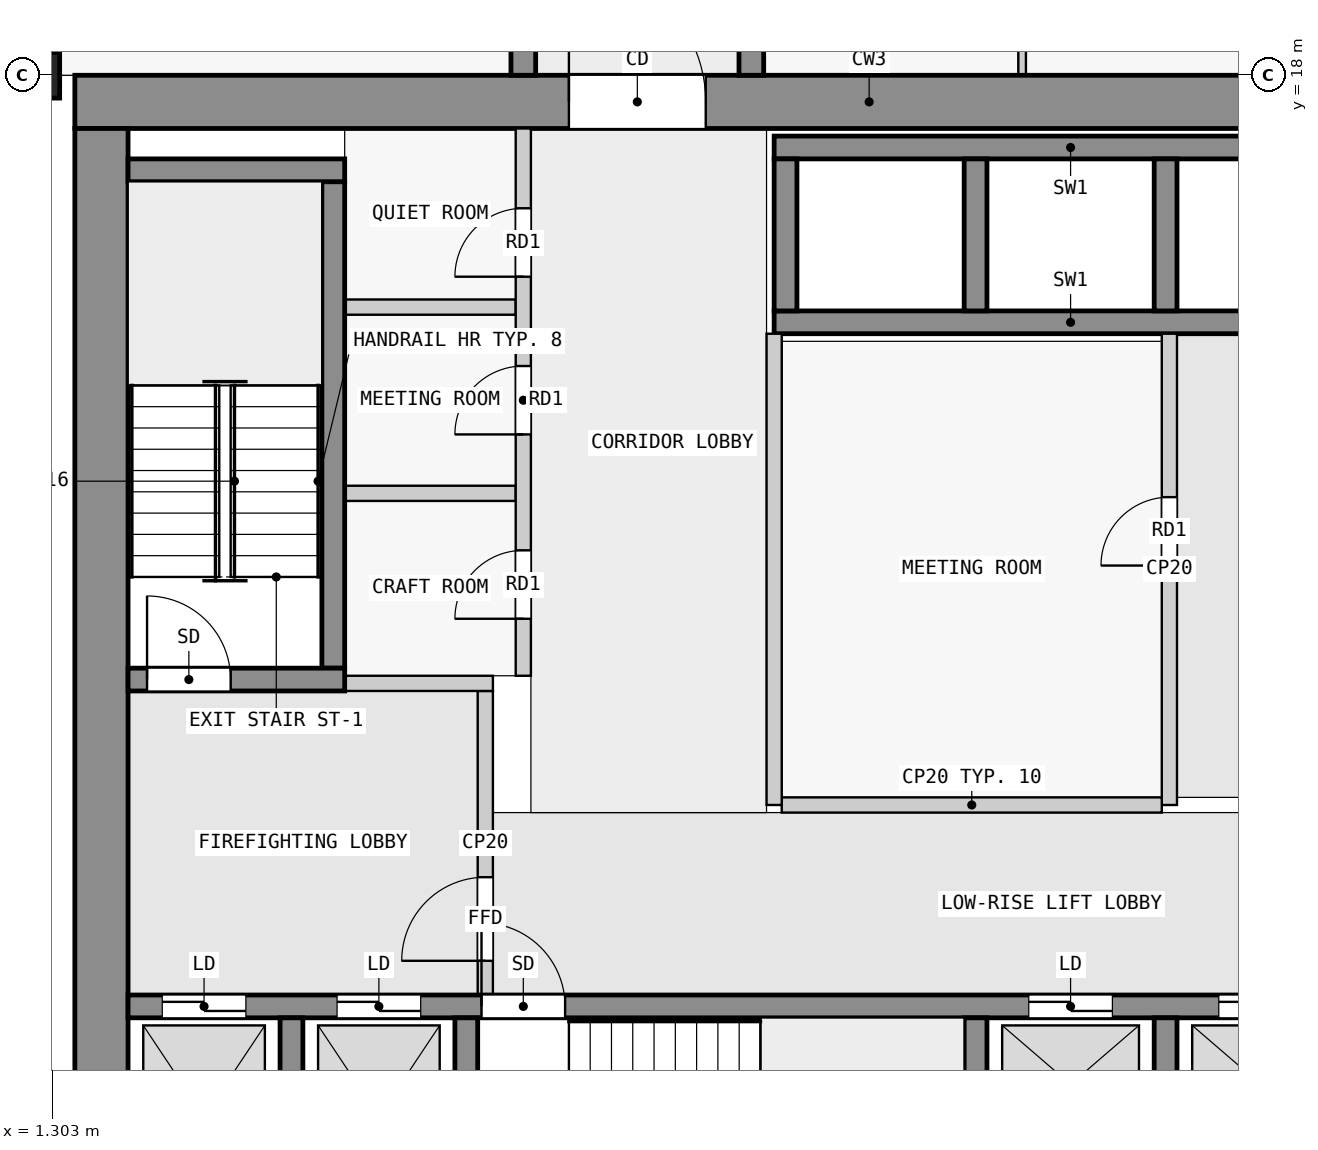
"""IFC4 building model, lengths in metres.
Left out: names, types, materials, properties, quantities, classifications, styles, units other than length and angle.
Written with IfcOpenShell. Run it as: python <this file> out.ifc"""

import sys

from ifc_helpers import new_model, si_unit, direction, frame, frame_2d, origin, origin_2d, place, context, subcontext, project, spatial, rectangle, extrude, element, fill, save


model = new_model("IFC4")
c1 = context("Model", 3, precision=1e-05, world=origin(), true_north=direction((0.0, 1.0)))
c2 = subcontext(c1, "Body", "Model", "MODEL_VIEW")
j1 = project(units=[si_unit("LENGTHUNIT", "METRE"), si_unit("PLANEANGLEUNIT", "RADIAN")], contexts=[c1])
p1 = place(None, origin())
s1 = spatial("IfcSite", under=j1, at=p1, CompositionType="ELEMENT")
p2 = place(p1, origin())
s2 = spatial("IfcBuilding", under=s1, at=p2, CompositionType="ELEMENT")
p3 = place(p2, frame((0.0, 0.0, 81.8)))
s3 = spatial("IfcBuildingStorey", under=s2, at=p3, CompositionType="ELEMENT", Elevation=81.8)
p4 = place(p3, frame((0.7, 18.0, 0.0), z_axis=(0.0, 0.0, 1.0), x_axis=(0.0, 1.0, 0.0)))
e1 = element("IfcColumn", 1, at=p4, inside=s3, PredefinedType="COLUMN", context=c2, shape_type="SweptSolid", body=[
    extrude(rectangle(XDim=0.6, YDim=1.4, at=origin_2d()), origin(), (0.0, 0.0, 1.0), 3.5),
])
p5 = place(p3, frame((1.6, 17.65, 0.0), z_axis=(0.0, 0.0, 1.0), x_axis=(1.0, 0.0, 0.0)))
e2 = element("IfcWall", 2, at=p5, inside=s3, PredefinedType="SHEAR", context=c2, shape_type="SweptSolid", body=[
    extrude(rectangle(XDim=20.9, YDim=0.7, at=frame_2d((10.45, 0.0))), origin(), (0.0, 0.0, 1.0), 3.25),
])
p6 = place(p5, frame((6.5, 0.0, 0.0)))
e3 = element("IfcOpeningElement", 3, at=p6, cuts=e2, PredefinedType="OPENING", context=c2, shape_type="SweptSolid", body=[
    extrude(rectangle(XDim=1.8, YDim=2.1, at=frame_2d((0.9, 1.05))), frame((0.0, 0.36, 0.0), z_axis=(0.0, -1.0, 0.0), x_axis=(1.0, 0.0, 0.0)), (0.0, 0.0, 1.0), 0.72),
])
p7 = place(p3, frame((1.95, 2.5, 0.0), z_axis=(0.0, 0.0, 1.0), x_axis=(0.0, 1.0, 0.0)))
e4 = element("IfcWall", 4, at=p7, inside=s3, PredefinedType="SHEAR", context=c2, shape_type="SweptSolid", body=[
    extrude(rectangle(XDim=14.8, YDim=0.7, at=frame_2d((7.4, 0.0))), origin(), (0.0, 0.0, 1.0), 3.25),
])
for number, where, z_axis, x_axis in (
    (5, (4.45, 2.8, 0.0), (0.0, 0.0, 1.0), (0.0, 1.0, 0.0)),
    (6, (6.75, 2.8, 0.0), (0.0, 0.0, 1.0), (0.0, 1.0, 0.0)),
    (7, (13.45, 2.8, 0.0), (0.0, 0.0, 1.0), (0.0, 1.0, 0.0)),
    (8, (15.95, 2.8, 0.0), (0.0, 0.0, 1.0), (0.0, 1.0, 0.0)),
):
    element("IfcWall", number, at=place(p3, frame(where, z_axis=z_axis, x_axis=x_axis)), inside=s3, PredefinedType="SHEAR", context=c2, shape_type="SweptSolid", body=[
        extrude(rectangle(XDim=2.8, YDim=0.3, at=frame_2d((1.4, 0.0))), origin(), (0.0, 0.0, 1.0), 3.25),
    ])
p8 = place(p3, frame((2.3, 5.75, 0.0), z_axis=(0.0, 0.0, 1.0), x_axis=(1.0, 0.0, 0.0)))
e9 = element("IfcWall", 9, at=p8, inside=s3, PredefinedType="SHEAR", context=c2, shape_type="SweptSolid", body=[
    extrude(rectangle(XDim=18.8, YDim=0.3, at=frame_2d((9.4, 0.0))), origin(), (0.0, 0.0, 1.0), 3.25),
])
p9 = place(p8, frame((4.65, 0.0, 0.0)))
e10 = element("IfcOpeningElement", 10, at=p9, cuts=e9, PredefinedType="OPENING", context=c2, shape_type="SweptSolid", body=[
    extrude(rectangle(XDim=1.1, YDim=2.1, at=frame_2d((0.55, 1.05))), frame((0.0, 0.16, 0.0), z_axis=(0.0, -1.0, 0.0), x_axis=(1.0, 0.0, 0.0)), (0.0, 0.0, 1.0), 0.32),
])
p10 = place(p8, frame((0.45, 0.0, 0.0)))
e11 = element("IfcOpeningElement", 11, at=p10, cuts=e9, PredefinedType="OPENING", context=c2, shape_type="SweptSolid", body=[
    extrude(rectangle(XDim=1.1, YDim=2.1, at=frame_2d((0.55, 1.05))), frame((0.0, 0.16, 0.0), z_axis=(0.0, -1.0, 0.0), x_axis=(1.0, 0.0, 0.0)), (0.0, 0.0, 1.0), 0.32),
])
p11 = place(p8, frame((2.75, 0.0, 0.0)))
e12 = element("IfcOpeningElement", 12, at=p11, cuts=e9, PredefinedType="OPENING", context=c2, shape_type="SweptSolid", body=[
    extrude(rectangle(XDim=1.1, YDim=2.1, at=frame_2d((0.55, 1.05))), frame((0.0, 0.16, 0.0), z_axis=(0.0, -1.0, 0.0), x_axis=(1.0, 0.0, 0.0)), (0.0, 0.0, 1.0), 0.32),
])
p12 = place(p8, frame((11.85, 0.0, 0.0)))
e13 = element("IfcOpeningElement", 13, at=p12, cuts=e9, PredefinedType="OPENING", context=c2, shape_type="SweptSolid", body=[
    extrude(rectangle(XDim=1.1, YDim=2.1, at=frame_2d((0.55, 1.05))), frame((0.0, 0.16, 0.0), z_axis=(0.0, -1.0, 0.0), x_axis=(1.0, 0.0, 0.0)), (0.0, 0.0, 1.0), 0.32),
])
p13 = place(p8, frame((14.35, 0.0, 0.0)))
e14 = element("IfcOpeningElement", 14, at=p13, cuts=e9, PredefinedType="OPENING", context=c2, shape_type="SweptSolid", body=[
    extrude(rectangle(XDim=1.1, YDim=2.1, at=frame_2d((0.55, 1.05))), frame((0.0, 0.16, 0.0), z_axis=(0.0, -1.0, 0.0), x_axis=(1.0, 0.0, 0.0)), (0.0, 0.0, 1.0), 0.32),
])
p14 = place(p8, frame((16.85, 0.0, 0.0)))
e15 = element("IfcOpeningElement", 15, at=p14, cuts=e9, PredefinedType="OPENING", context=c2, shape_type="SweptSolid", body=[
    extrude(rectangle(XDim=1.1, YDim=2.1, at=frame_2d((0.55, 1.05))), frame((0.0, 0.16, 0.0), z_axis=(0.0, -1.0, 0.0), x_axis=(1.0, 0.0, 0.0)), (0.0, 0.0, 1.0), 0.32),
])
p15 = place(p3, frame((2.3, 10.05, 0.0), z_axis=(0.0, 0.0, 1.0), x_axis=(1.0, 0.0, 0.0)))
e16 = element("IfcWall", 16, at=p15, inside=s3, PredefinedType="SHEAR", context=c2, shape_type="SweptSolid", body=[
    extrude(rectangle(XDim=2.85, YDim=0.3, at=frame_2d((1.425, 0.0))), origin(), (0.0, 0.0, 1.0), 3.25),
])
p16 = place(p15, frame((0.25, 0.0, 0.0)))
e17 = element("IfcOpeningElement", 17, at=p16, cuts=e16, PredefinedType="OPENING", context=c2, shape_type="SweptSolid", body=[
    extrude(rectangle(XDim=1.1, YDim=2.1, at=frame_2d((0.55, 1.05))), frame((0.0, 0.16, 0.0), z_axis=(0.0, -1.0, 0.0), x_axis=(1.0, 0.0, 0.0)), (0.0, 0.0, 1.0), 0.32),
])
p17 = place(p3, frame((5.0, 10.2, 0.0), z_axis=(0.0, 0.0, 1.0), x_axis=(0.0, 1.0, 0.0)))
e18 = element("IfcWall", 18, at=p17, inside=s3, PredefinedType="SHEAR", context=c2, shape_type="SweptSolid", body=[
    extrude(rectangle(XDim=6.4, YDim=0.3, at=frame_2d((3.2, 0.0))), origin(), (0.0, 0.0, 1.0), 3.25),
])
p18 = place(p3, frame((2.3, 16.75, 0.0), z_axis=(0.0, 0.0, 1.0), x_axis=(1.0, 0.0, 0.0)))
e19 = element("IfcWall", 19, at=p18, inside=s3, PredefinedType="SHEAR", context=c2, shape_type="SweptSolid", body=[
    extrude(rectangle(XDim=2.85, YDim=0.3, at=frame_2d((1.425, 0.0))), origin(), (0.0, 0.0, 1.0), 3.25),
])
for number, where, z_axis, x_axis in (
    (20, (10.8, 17.05, 0.0), (0.0, 0.0, 1.0), (1.0, 0.0, 0.0)),
    (21, (10.8, 14.75, 0.0), (0.0, 0.0, 1.0), (1.0, 0.0, 0.0)),
):
    element("IfcWall", number, at=place(p3, frame(where, z_axis=z_axis, x_axis=x_axis)), inside=s3, PredefinedType="SHEAR", context=c2, shape_type="SweptSolid", body=[
        extrude(rectangle(XDim=7.8, YDim=0.3, at=frame_2d((3.9, 0.0))), origin(), (0.0, 0.0, 1.0), 3.25),
    ])
for number, where, z_axis, x_axis in (
    (22, (10.95, 14.9, 0.0), (0.0, 0.0, 1.0), (0.0, 1.0, 0.0)),
    (23, (13.45, 14.9, 0.0), (0.0, 0.0, 1.0), (0.0, 1.0, 0.0)),
    (24, (15.95, 14.9, 0.0), (0.0, 0.0, 1.0), (0.0, 1.0, 0.0)),
):
    element("IfcWall", number, at=place(p3, frame(where, z_axis=z_axis, x_axis=x_axis)), inside=s3, PredefinedType="SHEAR", context=c2, shape_type="SweptSolid", body=[
        extrude(rectangle(XDim=2.0, YDim=0.3, at=frame_2d((1.0, 0.0))), origin(), (0.0, 0.0, 1.0), 3.25),
    ])
p19 = place(p3, frame((7.5, 18.0, 0.0), z_axis=(0.0, 0.0, 1.0), x_axis=(0.0, 1.0, 0.0)))
e25 = element("IfcWall", 25, at=p19, inside=s3, PredefinedType="SHEAR", context=c2, shape_type="SweptSolid", body=[
    extrude(rectangle(XDim=27.0, YDim=0.325, at=frame_2d((13.5, 0.0))), origin(), (0.0, 0.0, 1.0), 3.25),
])
p20 = place(p19, frame((1.75, 0.0, 0.0)))
e26 = element("IfcOpeningElement", 26, at=p20, cuts=e25, PredefinedType="OPENING", context=c2, shape_type="SweptSolid", body=[
    extrude(rectangle(XDim=1.0, YDim=2.1, at=frame_2d((0.5, 1.05))), frame((0.0, 0.172, 0.0), z_axis=(0.0, -1.0, 0.0), x_axis=(1.0, 0.0, 0.0)), (0.0, 0.0, 1.0), 0.345),
])
p21 = place(p19, frame((6.25, 0.0, 0.0)))
e27 = element("IfcOpeningElement", 27, at=p21, cuts=e25, PredefinedType="OPENING", context=c2, shape_type="SweptSolid", body=[
    extrude(rectangle(XDim=1.0, YDim=2.1, at=frame_2d((0.5, 1.05))), frame((0.0, 0.172, 0.0), z_axis=(0.0, -1.0, 0.0), x_axis=(1.0, 0.0, 0.0)), (0.0, 0.0, 1.0), 0.345),
])
p22 = place(p19, frame((10.75, 0.0, 0.0)))
e28 = element("IfcOpeningElement", 28, at=p22, cuts=e25, PredefinedType="OPENING", context=c2, shape_type="SweptSolid", body=[
    extrude(rectangle(XDim=1.0, YDim=2.1, at=frame_2d((0.5, 1.05))), frame((0.0, 0.172, 0.0), z_axis=(0.0, -1.0, 0.0), x_axis=(1.0, 0.0, 0.0)), (0.0, 0.0, 1.0), 0.345),
])
p23 = place(p19, frame((15.25, 0.0, 0.0)))
e29 = element("IfcOpeningElement", 29, at=p23, cuts=e25, PredefinedType="OPENING", context=c2, shape_type="SweptSolid", body=[
    extrude(rectangle(XDim=1.0, YDim=2.1, at=frame_2d((0.5, 1.05))), frame((0.0, 0.172, 0.0), z_axis=(0.0, -1.0, 0.0), x_axis=(1.0, 0.0, 0.0)), (0.0, 0.0, 1.0), 0.345),
])
p24 = place(p19, frame((21.35, 0.0, 0.0)))
e30 = element("IfcOpeningElement", 30, at=p24, cuts=e25, PredefinedType="OPENING", context=c2, shape_type="SweptSolid", body=[
    extrude(rectangle(XDim=1.0, YDim=2.1, at=frame_2d((0.5, 1.05))), frame((0.0, 0.172, 0.0), z_axis=(0.0, -1.0, 0.0), x_axis=(1.0, 0.0, 0.0)), (0.0, 0.0, 1.0), 0.345),
])
p25 = place(p3, frame((10.5, 18.0, 0.0), z_axis=(0.0, 0.0, 1.0), x_axis=(0.0, 1.0, 0.0)))
e31 = element("IfcWall", 31, at=p25, inside=s3, PredefinedType="SHEAR", context=c2, shape_type="SweptSolid", body=[
    extrude(rectangle(XDim=27.0, YDim=0.325, at=frame_2d((13.5, 0.0))), origin(), (0.0, 0.0, 1.0), 3.25),
])
p26 = place(p25, frame((4.05, 0.0, 0.0)))
e32 = element("IfcOpeningElement", 32, at=p26, cuts=e31, PredefinedType="OPENING", context=c2, shape_type="SweptSolid", body=[
    extrude(rectangle(XDim=1.0, YDim=2.1, at=frame_2d((0.5, 1.05))), frame((0.0, 0.172, 0.0), z_axis=(0.0, -1.0, 0.0), x_axis=(1.0, 0.0, 0.0)), (0.0, 0.0, 1.0), 0.345),
])
p27 = place(p25, frame((13.05, 0.0, 0.0)))
e33 = element("IfcOpeningElement", 33, at=p27, cuts=e31, PredefinedType="OPENING", context=c2, shape_type="SweptSolid", body=[
    extrude(rectangle(XDim=1.0, YDim=2.1, at=frame_2d((0.5, 1.05))), frame((0.0, 0.172, 0.0), z_axis=(0.0, -1.0, 0.0), x_axis=(1.0, 0.0, 0.0)), (0.0, 0.0, 1.0), 0.345),
])
p28 = place(p25, frame((19.75, 0.0, 0.0)))
e34 = element("IfcOpeningElement", 34, at=p28, cuts=e31, PredefinedType="OPENING", context=c2, shape_type="SweptSolid", body=[
    extrude(rectangle(XDim=1.0, YDim=2.1, at=frame_2d((0.5, 1.05))), frame((0.0, 0.172, 0.0), z_axis=(0.0, -1.0, 0.0), x_axis=(1.0, 0.0, 0.0)), (0.0, 0.0, 1.0), 0.345),
])
p29 = place(p25, frame((23.25, 0.0, 0.0)))
e35 = element("IfcOpeningElement", 35, at=p29, cuts=e31, PredefinedType="OPENING", context=c2, shape_type="SweptSolid", body=[
    extrude(rectangle(XDim=0.9, YDim=2.1, at=frame_2d((0.45, 1.05))), frame((0.0, 0.172, 0.0), z_axis=(0.0, -1.0, 0.0), x_axis=(1.0, 0.0, 0.0)), (0.0, 0.0, 1.0), 0.345),
])
p30 = place(p25, frame((25.45, 0.0, 0.0)))
e36 = element("IfcOpeningElement", 36, at=p30, cuts=e31, PredefinedType="OPENING", context=c2, shape_type="SweptSolid", body=[
    extrude(rectangle(XDim=1.0, YDim=2.1, at=frame_2d((0.5, 1.05))), frame((0.0, 0.172, 0.0), z_axis=(0.0, -1.0, 0.0), x_axis=(1.0, 0.0, 0.0)), (0.0, 0.0, 1.0), 0.345),
])
p31 = place(p3, frame((7.0, 5.9, 0.0), z_axis=(0.0, 0.0, 1.0), x_axis=(0.0, 1.0, 0.0)))
e37 = element("IfcWall", 37, at=p31, inside=s3, PredefinedType="PARTITIONING", context=c2, shape_type="SweptSolid", body=[
    extrude(rectangle(XDim=4.0, YDim=0.2, at=frame_2d((2.0, 0.0))), origin(), (0.0, 0.0, 1.0), 3.25),
])
p32 = place(p31, frame((0.45, 0.0, 0.0)))
e38 = element("IfcOpeningElement", 38, at=p32, cuts=e37, PredefinedType="OPENING", context=c2, shape_type="SweptSolid", body=[
    extrude(rectangle(XDim=1.1, YDim=2.1, at=frame_2d((0.55, 1.05))), frame((0.0, 0.11, 0.0), z_axis=(0.0, -1.0, 0.0), x_axis=(1.0, 0.0, 0.0)), (0.0, 0.0, 1.0), 0.22),
])
p33 = place(p3, frame((5.15, 10.0, 0.0), z_axis=(0.0, 0.0, 1.0), x_axis=(1.0, 0.0, 0.0)))
e39 = element("IfcWall", 39, at=p33, inside=s3, PredefinedType="PARTITIONING", context=c2, shape_type="SweptSolid", body=[
    extrude(rectangle(XDim=1.95, YDim=0.2, at=frame_2d((0.975, 0.0))), origin(), (0.0, 0.0, 1.0), 3.25),
])
p34 = place(p3, frame((10.8, 8.4, 0.0), z_axis=(0.0, 0.0, 1.0), x_axis=(0.0, 1.0, 0.0)))
e40 = element("IfcWall", 40, at=p34, inside=s3, PredefinedType="PARTITIONING", context=c2, shape_type="SweptSolid", body=[
    extrude(rectangle(XDim=6.2, YDim=0.2, at=frame_2d((3.1, 0.0))), origin(), (0.0, 0.0, 1.0), 3.25),
])
p35 = place(p3, frame((10.9, 8.4, 0.0), z_axis=(0.0, 0.0, 1.0), x_axis=(1.0, 0.0, 0.0)))
e41 = element("IfcWall", 41, at=p35, inside=s3, PredefinedType="PARTITIONING", context=c2, shape_type="SweptSolid", body=[
    extrude(rectangle(XDim=5.0, YDim=0.2, at=frame_2d((2.5, 0.0))), origin(), (0.0, 0.0, 1.0), 3.25),
])
p36 = place(p3, frame((16.0, 8.4, 0.0), z_axis=(0.0, 0.0, 1.0), x_axis=(0.0, 1.0, 0.0)))
e42 = element("IfcWall", 42, at=p36, inside=s3, PredefinedType="PARTITIONING", context=c2, shape_type="SweptSolid", body=[
    extrude(rectangle(XDim=6.2, YDim=0.2, at=frame_2d((3.1, 0.0))), origin(), (0.0, 0.0, 1.0), 3.25),
])
p37 = place(p36, frame((3.15, 0.0, 0.0)))
e43 = element("IfcOpeningElement", 43, at=p37, cuts=e42, PredefinedType="OPENING", context=c2, shape_type="SweptSolid", body=[
    extrude(rectangle(XDim=0.9, YDim=2.1, at=frame_2d((0.45, 1.05))), frame((0.0, 0.11, 0.0), z_axis=(0.0, -1.0, 0.0), x_axis=(1.0, 0.0, 0.0)), (0.0, 0.0, 1.0), 0.22),
])
p38 = place(p3, frame((7.5, 10.1, 0.0), z_axis=(0.0, 0.0, 1.0), x_axis=(0.0, 1.0, 0.0)))
e44 = element("IfcWall", 44, at=p38, inside=s3, PredefinedType="PARTITIONING", context=c2, shape_type="SweptSolid", body=[
    extrude(rectangle(XDim=7.2, YDim=0.2, at=frame_2d((3.6, 0.0))), origin(), (0.0, 0.0, 1.0), 3.25),
])
p39 = place(p38, frame((0.75, 0.0, 0.0)))
e45 = element("IfcOpeningElement", 45, at=p39, cuts=e44, PredefinedType="OPENING", context=c2, shape_type="SweptSolid", body=[
    extrude(rectangle(XDim=0.9, YDim=2.1, at=frame_2d((0.45, 1.05))), frame((0.0, 0.11, 0.0), z_axis=(0.0, -1.0, 0.0), x_axis=(1.0, 0.0, 0.0)), (0.0, 0.0, 1.0), 0.22),
])
p40 = place(p38, frame((3.175, 0.0, 0.0)))
e46 = element("IfcOpeningElement", 46, at=p40, cuts=e44, PredefinedType="OPENING", context=c2, shape_type="SweptSolid", body=[
    extrude(rectangle(XDim=0.9, YDim=2.1, at=frame_2d((0.45, 1.05))), frame((0.0, 0.11, 0.0), z_axis=(0.0, -1.0, 0.0), x_axis=(1.0, 0.0, 0.0)), (0.0, 0.0, 1.0), 0.22),
])
p41 = place(p38, frame((5.25, 0.0, 0.0)))
e47 = element("IfcOpeningElement", 47, at=p41, cuts=e44, PredefinedType="OPENING", context=c2, shape_type="SweptSolid", body=[
    extrude(rectangle(XDim=0.9, YDim=2.1, at=frame_2d((0.45, 1.05))), frame((0.0, 0.11, 0.0), z_axis=(0.0, -1.0, 0.0), x_axis=(1.0, 0.0, 0.0)), (0.0, 0.0, 1.0), 0.22),
])
for number, where, z_axis, x_axis in (
    (48, (5.15, 12.5, 0.0), (0.0, 0.0, 1.0), (1.0, 0.0, 0.0)),
    (49, (5.15, 14.95, 0.0), (0.0, 0.0, 1.0), (1.0, 0.0, 0.0)),
):
    element("IfcWall", number, at=place(p3, frame(where, z_axis=z_axis, x_axis=x_axis)), inside=s3, PredefinedType="PARTITIONING", context=c2, shape_type="SweptSolid", body=[
        extrude(rectangle(XDim=2.25, YDim=0.2, at=frame_2d((1.125, 0.0))), origin(), (0.0, 0.0, 1.0), 3.25),
    ])
p42 = place(p3, frame((14.062, 18.0, 0.0), z_axis=(0.0, 0.0, 1.0), x_axis=(0.0, 1.0, 0.0)))
e50 = element("IfcWall", 50, at=p42, inside=s3, PredefinedType="PARTITIONING", context=c2, shape_type="SweptSolid", body=[
    extrude(rectangle(XDim=1.75, YDim=0.1, at=frame_2d((0.875, 0.0))), origin(), (0.0, 0.0, 1.0), 3.25),
])
p43 = place(p32, origin())
e51 = element("IfcDoor", 51, at=p43, inside=s3, OperationType="SINGLE_SWING_LEFT", PredefinedType="DOOR", context=c2, shape_type="SweptSolid", body=[
    extrude(rectangle(XDim=1.1, YDim=2.1, at=frame_2d((0.55, 1.05))), frame((0.0, 0.025, 0.0), z_axis=(0.0, -1.0, 0.0), x_axis=(1.0, 0.0, 0.0)), (0.0, 0.0, 1.0), 0.05),
])
fill(e38, e51)
p44 = place(p16, origin())
e52 = element("IfcDoor", 52, at=p44, inside=s3, OperationType="SINGLE_SWING_RIGHT", PredefinedType="DOOR", context=c2, shape_type="SweptSolid", body=[
    extrude(rectangle(XDim=1.1, YDim=2.1, at=frame_2d((0.55, 1.05))), frame((0.0, 0.025, 0.0), z_axis=(0.0, -1.0, 0.0), x_axis=(1.0, 0.0, 0.0)), (0.0, 0.0, 1.0), 0.05),
])
fill(e17, e52)
p45 = place(p37, origin())
e53 = element("IfcDoor", 53, at=p45, inside=s3, OperationType="SINGLE_SWING_LEFT", PredefinedType="DOOR", context=c2, shape_type="SweptSolid", body=[
    extrude(rectangle(XDim=0.9, YDim=2.1, at=frame_2d((0.45, 1.05))), frame((0.0, 0.025, 0.0), z_axis=(0.0, -1.0, 0.0), x_axis=(1.0, 0.0, 0.0)), (0.0, 0.0, 1.0), 0.05),
])
fill(e43, e53)
p46 = place(p9, origin())
e54 = element("IfcDoor", 54, at=p46, inside=s3, OperationType="SINGLE_SWING_LEFT", PredefinedType="DOOR", context=c2, shape_type="SweptSolid", body=[
    extrude(rectangle(XDim=1.1, YDim=2.1, at=frame_2d((0.55, 1.05))), frame((0.0, 0.025, 0.0), z_axis=(0.0, -1.0, 0.0), x_axis=(1.0, 0.0, 0.0)), (0.0, 0.0, 1.0), 0.05),
])
fill(e10, e54)
p47 = place(p10, origin())
e55 = element("IfcDoor", 55, at=p47, inside=s3, OperationType="DOUBLE_DOOR_SLIDING", PredefinedType="DOOR", context=c2, shape_type="SweptSolid", body=[
    extrude(rectangle(XDim=1.1, YDim=2.1, at=frame_2d((0.55, 1.05))), frame((0.0, 0.025, 0.0), z_axis=(0.0, -1.0, 0.0), x_axis=(1.0, 0.0, 0.0)), (0.0, 0.0, 1.0), 0.05),
])
fill(e11, e55)
p48 = place(p11, origin())
e56 = element("IfcDoor", 56, at=p48, inside=s3, OperationType="DOUBLE_DOOR_SLIDING", PredefinedType="DOOR", context=c2, shape_type="SweptSolid", body=[
    extrude(rectangle(XDim=1.1, YDim=2.1, at=frame_2d((0.55, 1.05))), frame((0.0, 0.025, 0.0), z_axis=(0.0, -1.0, 0.0), x_axis=(1.0, 0.0, 0.0)), (0.0, 0.0, 1.0), 0.05),
])
fill(e12, e56)
p49 = place(p12, origin())
e57 = element("IfcDoor", 57, at=p49, inside=s3, OperationType="DOUBLE_DOOR_SLIDING", PredefinedType="DOOR", context=c2, shape_type="SweptSolid", body=[
    extrude(rectangle(XDim=1.1, YDim=2.1, at=frame_2d((0.55, 1.05))), frame((0.0, 0.025, 0.0), z_axis=(0.0, -1.0, 0.0), x_axis=(1.0, 0.0, 0.0)), (0.0, 0.0, 1.0), 0.05),
])
fill(e13, e57)
p50 = place(p13, origin())
e58 = element("IfcDoor", 58, at=p50, inside=s3, OperationType="DOUBLE_DOOR_SLIDING", PredefinedType="DOOR", context=c2, shape_type="SweptSolid", body=[
    extrude(rectangle(XDim=1.1, YDim=2.1, at=frame_2d((0.55, 1.05))), frame((0.0, 0.025, 0.0), z_axis=(0.0, -1.0, 0.0), x_axis=(1.0, 0.0, 0.0)), (0.0, 0.0, 1.0), 0.05),
])
fill(e14, e58)
p51 = place(p6, origin())
e59 = element("IfcDoor", 59, at=p51, inside=s3, OperationType="DOUBLE_DOOR_SINGLE_SWING", PredefinedType="DOOR", context=c2, shape_type="SweptSolid", body=[
    extrude(rectangle(XDim=1.8, YDim=2.1, at=frame_2d((0.9, 1.05))), frame((0.0, 0.025, 0.0), z_axis=(0.0, -1.0, 0.0), x_axis=(1.0, 0.0, 0.0)), (0.0, 0.0, 1.0), 0.05),
])
fill(e3, e59)
p52 = place(p39, origin())
e60 = element("IfcDoor", 60, at=p52, inside=s3, OperationType="SINGLE_SWING_RIGHT", PredefinedType="DOOR", context=c2, shape_type="SweptSolid", body=[
    extrude(rectangle(XDim=0.9, YDim=2.1, at=frame_2d((0.45, 1.05))), frame((0.0, 0.025, 0.0), z_axis=(0.0, -1.0, 0.0), x_axis=(1.0, 0.0, 0.0)), (0.0, 0.0, 1.0), 0.05),
])
fill(e45, e60)
p53 = place(p40, origin())
e61 = element("IfcDoor", 61, at=p53, inside=s3, OperationType="SINGLE_SWING_RIGHT", PredefinedType="DOOR", context=c2, shape_type="SweptSolid", body=[
    extrude(rectangle(XDim=0.9, YDim=2.1, at=frame_2d((0.45, 1.05))), frame((0.0, 0.025, 0.0), z_axis=(0.0, -1.0, 0.0), x_axis=(1.0, 0.0, 0.0)), (0.0, 0.0, 1.0), 0.05),
])
fill(e46, e61)
p54 = place(p41, origin())
e62 = element("IfcDoor", 62, at=p54, inside=s3, OperationType="SINGLE_SWING_RIGHT", PredefinedType="DOOR", context=c2, shape_type="SweptSolid", body=[
    extrude(rectangle(XDim=0.9, YDim=2.1, at=frame_2d((0.45, 1.05))), frame((0.0, 0.025, 0.0), z_axis=(0.0, -1.0, 0.0), x_axis=(1.0, 0.0, 0.0)), (0.0, 0.0, 1.0), 0.05),
])
fill(e47, e62)
save(model, sys.argv[1])
